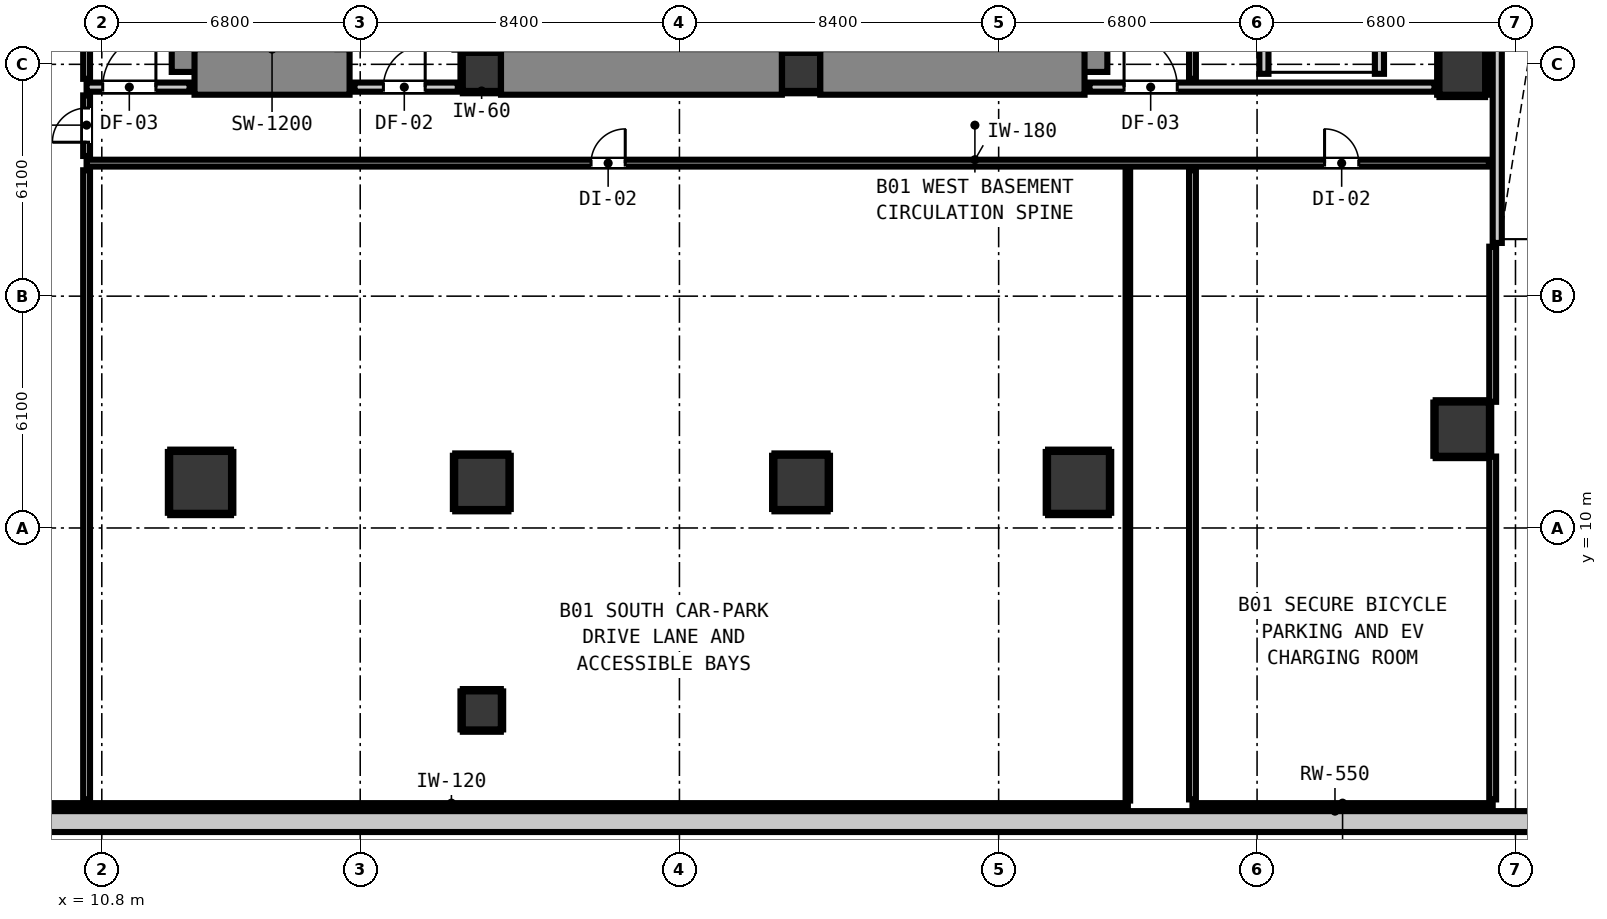
"""IFC4 building model, lengths in metres.
Left out: names, types, materials, properties, quantities, classifications, styles, units other than length and angle.
Written with IfcOpenShell. Run it as: python <this file> out.ifc"""

import sys

from ifc_helpers import new_model, si_unit, direction, frame, frame_2d, origin, origin_2d, place, context, subcontext, project, spatial, rectangle, circle, extrude, element, fill, save


model = new_model("IFC4")
c1 = context("Model", 3, precision=1e-05, world=origin(), true_north=direction((0.0, 1.0)))
c2 = subcontext(c1, "Body", "Model", "MODEL_VIEW")
j1 = project(units=[si_unit("LENGTHUNIT", "METRE"), si_unit("PLANEANGLEUNIT", "RADIAN")], contexts=[c1])
p1 = place(None, origin())
s1 = spatial("IfcSite", under=j1, at=p1, CompositionType="ELEMENT")
p2 = place(p1, origin())
s2 = spatial("IfcBuilding", under=s1, at=p2, CompositionType="ELEMENT")
p3 = place(p2, frame((0.0, 0.0, -4.4)))
s3 = spatial("IfcBuildingStorey", under=s2, at=p3, CompositionType="ELEMENT", Elevation=-4.4)
p4 = place(p3, frame((1.5, 2.275, 0.0), z_axis=(0.0, 0.0, 1.0), x_axis=(1.0, 0.0, 0.0)))
e1 = element("IfcWall", 1, at=p4, inside=s3, PredefinedType="SOLIDWALL", context=c2, shape_type="SweptSolid", body=[
    extrude(rectangle(XDim=83.5, YDim=0.55, at=frame_2d((41.75, 0.0))), origin(), (0.0, 0.0, 1.0), 4.4),
])
for number, where, z_axis, x_axis in (
    (2, (20.8, 22.0, 0.0), (0.0, 0.0, 1.0), (1.0, 0.0, 0.0)),
    (3, (29.2, 22.0, 0.0), (0.0, 0.0, 1.0), (1.0, 0.0, 0.0)),
):
    element("IfcColumn", number, at=place(p3, frame(where, z_axis=z_axis, x_axis=x_axis)), inside=s3, PredefinedType="COLUMN", context=c2, shape_type="SweptSolid", body=[
        extrude(rectangle(XDim=1.0, YDim=1.0, at=origin_2d()), origin(), (0.0, 0.0, 1.0), 4.4),
    ])
p5 = place(p3, frame((13.24, 22.0, 0.0), z_axis=(0.0, 0.0, 1.0), x_axis=(0.0, 1.0, 0.0)))
e4 = element("IfcWall", 4, at=p5, inside=s3, PredefinedType="SHEAR", context=c2, shape_type="SweptSolid", body=[
    extrude(rectangle(XDim=8.195, YDim=1.2, at=frame_2d((4.098, 0.0))), origin(), (0.0, 0.0, 1.0), 4.4),
])
p6 = place(p3, frame((13.24, 22.0, 0.0), z_axis=(0.0, 0.0, 1.0), x_axis=(1.0, 0.0, 0.0)))
e5 = element("IfcWall", 5, at=p6, inside=s3, PredefinedType="SHEAR", context=c2, shape_type="SweptSolid", body=[
    extrude(rectangle(XDim=4.08, YDim=1.2, at=frame_2d((2.04, 0.0))), origin(), (0.0, 0.0, 1.0), 4.4),
])
p7 = place(p3, frame((36.66, 22.0, 0.0), z_axis=(0.0, 0.0, 1.0), x_axis=(0.0, 1.0, 0.0)))
e6 = element("IfcWall", 6, at=p7, inside=s3, PredefinedType="SHEAR", context=c2, shape_type="SweptSolid", body=[
    extrude(rectangle(XDim=8.195, YDim=1.2, at=frame_2d((4.098, 0.0))), origin(), (0.0, 0.0, 1.0), 4.4),
])
p8 = place(p3, frame((29.705, 22.0, 0.0), z_axis=(0.0, 0.0, 1.0), x_axis=(1.0, 0.0, 0.0)))
e7 = element("IfcWall", 7, at=p8, inside=s3, PredefinedType="SHEAR", context=c2, shape_type="SweptSolid", body=[
    extrude(rectangle(XDim=6.955, YDim=1.2, at=frame_2d((3.478, 0.0))), origin(), (0.0, 0.0, 1.0), 4.4),
])
p9 = place(p3, frame((21.305, 22.0, 0.0), z_axis=(0.0, 0.0, 1.0), x_axis=(1.0, 0.0, 0.0)))
e8 = element("IfcWall", 8, at=p9, inside=s3, PredefinedType="SHEAR", context=c2, shape_type="SweptSolid", body=[
    extrude(rectangle(XDim=7.39, YDim=1.2, at=frame_2d((3.695, 0.0))), origin(), (0.0, 0.0, 1.0), 4.4),
])
for number, where, z_axis, x_axis in (
    (9, (13.4, 11.2, 0.0), (0.0, 0.0, 1.0), (1.0, 0.0, 0.0)),
    (10, (36.5, 11.2, 0.0), (0.0, 0.0, 1.0), (1.0, 0.0, 0.0)),
):
    element("IfcColumn", number, at=place(p3, frame(where, z_axis=z_axis, x_axis=x_axis)), inside=s3, PredefinedType="COLUMN", context=c2, shape_type="SweptSolid", body=[
        extrude(rectangle(XDim=1.6, YDim=1.6, at=origin_2d()), origin(), (0.0, 0.0, 1.0), 4.4),
    ])
p10 = place(p3, frame((46.6, 22.0, 0.0), z_axis=(0.0, 0.0, 1.0), x_axis=(1.0, 0.0, 0.0)))
e11 = element("IfcColumn", 11, at=p10, inside=s3, PredefinedType="COLUMN", context=c2, shape_type="SweptSolid", body=[
    extrude(circle(Radius=0.6, at=origin_2d()), origin(), (0.0, 0.0, 1.0), 4.4),
])
for number, where, z_axis, x_axis in (
    (12, (46.6, 12.6, 0.0), (0.0, 0.0, 1.0), (1.0, 0.0, 0.0)),
    (13, (20.8, 11.2, 0.0), (0.0, 0.0, 1.0), (1.0, 0.0, 0.0)),
    (14, (29.2, 11.2, 0.0), (0.0, 0.0, 1.0), (1.0, 0.0, 0.0)),
):
    element("IfcColumn", number, at=place(p3, frame(where, z_axis=z_axis, x_axis=x_axis)), inside=s3, PredefinedType="COLUMN", context=c2, shape_type="SweptSolid", body=[
        extrude(rectangle(XDim=1.4, YDim=1.4, at=origin_2d()), origin(), (0.0, 0.0, 1.0), 4.4),
    ])
p11 = place(p3, frame((20.8, 5.2, 0.0), z_axis=(0.0, 0.0, 1.0), x_axis=(1.0, 0.0, 0.0)))
e15 = element("IfcColumn", 15, at=p11, inside=s3, PredefinedType="COLUMN", context=c2, shape_type="SweptSolid", body=[
    extrude(rectangle(XDim=1.0, YDim=1.0, at=origin_2d()), origin(), (0.0, 0.0, 1.0), 4.16),
])
p12 = place(p3, frame((47.52, 17.5, 0.0), z_axis=(0.0, 0.0, 1.0), x_axis=(0.0, 1.0, 0.0)))
e16 = element("IfcWall", 16, at=p12, inside=s3, PredefinedType="PARAPET", context=c2, shape_type="SweptSolid", body=[
    extrude(rectangle(XDim=19.2, YDim=0.24, at=frame_2d((9.6, 0.0))), origin(), (0.0, 0.0, 1.0), 1.2),
])
for number, where, z_axis, x_axis in (
    (17, (41.38, 21.95, 0.0), (0.0, 0.0, 1.0), (0.0, 1.0, 0.0)),
    (18, (44.42, 21.95, 0.0), (0.0, 0.0, 1.0), (0.0, 1.0, 0.0)),
):
    element("IfcWall", number, at=place(p3, frame(where, z_axis=z_axis, x_axis=x_axis)), inside=s3, PredefinedType="PARAPET", context=c2, shape_type="SweptSolid", body=[
        extrude(rectangle(XDim=28.85, YDim=0.24, at=frame_2d((14.425, 0.0))), origin(), (0.0, 0.0, 1.0), 3.96),
    ])
p13 = place(p3, frame((10.4, 21.6, 0.0), z_axis=(0.0, 0.0, 1.0), x_axis=(1.0, 0.0, 0.0)))
e19 = element("IfcWall", 19, at=p13, inside=s3, PredefinedType="PARTITIONING", context=c2, shape_type="SweptSolid", body=[
    extrude(rectangle(XDim=2.71, YDim=0.24, at=frame_2d((1.355, 0.0))), origin(), (0.0, 0.0, 1.0), 3.215),
])
p14 = place(p13, frame((0.424, 0.0, 0.0)))
e20 = element("IfcOpeningElement", 20, at=p14, cuts=e19, PredefinedType="OPENING", context=c2, shape_type="SweptSolid", body=[
    extrude(rectangle(XDim=1.4, YDim=2.15, at=frame_2d((0.7, 1.075))), frame((0.0, 0.13, 0.0), z_axis=(0.0, -1.0, 0.0), x_axis=(1.0, 0.0, 0.0)), (0.0, 0.0, 1.0), 0.26),
])
p15 = place(p3, frame((17.45, 21.6, 0.0), z_axis=(0.0, 0.0, 1.0), x_axis=(1.0, 0.0, 0.0)))
e21 = element("IfcWall", 21, at=p15, inside=s3, PredefinedType="PARTITIONING", context=c2, shape_type="SweptSolid", body=[
    extrude(rectangle(XDim=2.718, YDim=0.24, at=frame_2d((1.359, 0.0))), origin(), (0.0, 0.0, 1.0), 3.215),
])
p16 = place(p15, frame((0.76, 0.0, 0.0)))
e22 = element("IfcOpeningElement", 22, at=p16, cuts=e21, PredefinedType="OPENING", context=c2, shape_type="SweptSolid", body=[
    extrude(rectangle(XDim=1.1, YDim=2.15, at=frame_2d((0.55, 1.075))), frame((0.0, 0.13, 0.0), z_axis=(0.0, -1.0, 0.0), x_axis=(1.0, 0.0, 0.0)), (0.0, 0.0, 1.0), 0.26),
])
p17 = place(p3, frame((36.79, 21.6, 0.0), z_axis=(0.0, 0.0, 1.0), x_axis=(1.0, 0.0, 0.0)))
e23 = element("IfcWall", 23, at=p17, inside=s3, PredefinedType="PARTITIONING", context=c2, shape_type="SweptSolid", body=[
    extrude(rectangle(XDim=9.078, YDim=0.24, at=frame_2d((4.539, 0.0))), origin(), (0.0, 0.0, 1.0), 3.215),
])
p18 = place(p17, frame((0.91, 0.0, 0.0)))
e24 = element("IfcOpeningElement", 24, at=p18, cuts=e23, PredefinedType="OPENING", context=c2, shape_type="SweptSolid", body=[
    extrude(rectangle(XDim=1.4, YDim=2.15, at=frame_2d((0.7, 1.075))), frame((0.0, 0.13, 0.0), z_axis=(0.0, -1.0, 0.0), x_axis=(1.0, 0.0, 0.0)), (0.0, 0.0, 1.0), 0.26),
])
p19 = place(p3, frame((10.4, 19.6, 0.0), z_axis=(0.0, 0.0, 1.0), x_axis=(1.0, 0.0, 0.0)))
e25 = element("IfcWall", 25, at=p19, inside=s3, PredefinedType="PARTITIONING", context=c2, shape_type="SweptSolid", body=[
    extrude(rectangle(XDim=36.902, YDim=0.18, at=frame_2d((18.451, 0.0))), origin(), (0.0, 0.0, 1.0), 3.98),
])
p20 = place(p19, frame((13.274, 0.0, 0.0)))
e26 = element("IfcOpeningElement", 26, at=p20, cuts=e25, PredefinedType="OPENING", context=c2, shape_type="SweptSolid", body=[
    extrude(rectangle(XDim=0.9, YDim=2.1, at=frame_2d((0.45, 1.05))), frame((0.0, 0.1, 0.0), z_axis=(0.0, -1.0, 0.0), x_axis=(1.0, 0.0, 0.0)), (0.0, 0.0, 1.0), 0.2),
])
p21 = place(p19, frame((32.576, 0.0, 0.0)))
e27 = element("IfcOpeningElement", 27, at=p21, cuts=e25, PredefinedType="OPENING", context=c2, shape_type="SweptSolid", body=[
    extrude(rectangle(XDim=0.9, YDim=2.1, at=frame_2d((0.45, 1.05))), frame((0.0, 0.1, 0.0), z_axis=(0.0, -1.0, 0.0), x_axis=(1.0, 0.0, 0.0)), (0.0, 0.0, 1.0), 0.2),
])
p22 = place(p3, frame((2.2, 2.7, 0.0), z_axis=(0.0, 0.0, 1.0), x_axis=(1.0, 0.0, 0.0)))
e28 = element("IfcWall", 28, at=p22, inside=s3, PredefinedType="PARTITIONING", context=c2, shape_type="SweptSolid", body=[
    extrude(rectangle(XDim=35.6, YDim=0.12, at=frame_2d((17.8, 0.0))), origin(), (0.0, 0.0, 1.0), 3.98),
])
p23 = place(p3, frame((39.5, 2.7, 0.0), z_axis=(0.0, 0.0, 1.0), x_axis=(1.0, 0.0, 0.0)))
e29 = element("IfcWall", 29, at=p23, inside=s3, PredefinedType="PARTITIONING", context=c2, shape_type="SweptSolid", body=[
    extrude(rectangle(XDim=7.9, YDim=0.12, at=frame_2d((3.95, 0.0))), origin(), (0.0, 0.0, 1.0), 3.98),
])
p24 = place(p3, frame((10.4, 2.858, 0.0), z_axis=(0.0, 0.0, 1.0), x_axis=(0.0, 1.0, 0.0)))
e30 = element("IfcWall", 30, at=p24, inside=s3, PredefinedType="PARTITIONING", context=c2, shape_type="SweptSolid", body=[
    extrude(rectangle(XDim=16.554, YDim=0.18, at=frame_2d((8.277, 0.0))), origin(), (0.0, 0.0, 1.0), 3.98),
])
p25 = place(p3, frame((10.4, 19.788, 0.0), z_axis=(0.0, 0.0, 1.0), x_axis=(0.0, 1.0, 0.0)))
e31 = element("IfcWall", 31, at=p25, inside=s3, PredefinedType="PARTITIONING", context=c2, shape_type="SweptSolid", body=[
    extrude(rectangle(XDim=1.594, YDim=0.18, at=frame_2d((0.797, 0.0))), origin(), (0.0, 0.0, 1.0), 3.98),
])
p26 = place(p25, frame((0.362, 0.0, 0.0)))
e32 = element("IfcOpeningElement", 32, at=p26, cuts=e31, PredefinedType="OPENING", context=c2, shape_type="SweptSolid", body=[
    extrude(rectangle(XDim=0.9, YDim=2.1, at=frame_2d((0.45, 1.05))), frame((0.0, 0.1, 0.0), z_axis=(0.0, -1.0, 0.0), x_axis=(1.0, 0.0, 0.0)), (0.0, 0.0, 1.0), 0.2),
])
p27 = place(p3, frame((10.4, 21.818, 0.0), z_axis=(0.0, 0.0, 1.0), x_axis=(0.0, 1.0, 0.0)))
e33 = element("IfcWall", 33, at=p27, inside=s3, PredefinedType="PARTITIONING", context=c2, shape_type="SweptSolid", body=[
    extrude(rectangle(XDim=17.794, YDim=0.18, at=frame_2d((8.897, 0.0))), origin(), (0.0, 0.0, 1.0), 3.98),
])
p28 = place(p3, frame((39.5, 2.858, 0.0), z_axis=(0.0, 0.0, 1.0), x_axis=(0.0, 1.0, 0.0)))
e34 = element("IfcWall", 34, at=p28, inside=s3, PredefinedType="PARTITIONING", context=c2, shape_type="SweptSolid", body=[
    extrude(rectangle(XDim=16.554, YDim=0.18, at=frame_2d((8.277, 0.0))), origin(), (0.0, 0.0, 1.0), 3.98),
])
p29 = place(p3, frame((39.5, 21.818, 0.0), z_axis=(0.0, 0.0, 1.0), x_axis=(0.0, 1.0, 0.0)))
e35 = element("IfcWall", 35, at=p29, inside=s3, PredefinedType="PARTITIONING", context=c2, shape_type="SweptSolid", body=[
    extrude(rectangle(XDim=17.794, YDim=0.18, at=frame_2d((8.897, 0.0))), origin(), (0.0, 0.0, 1.0), 3.98),
])
p30 = place(p3, frame((47.4, 2.858, 0.0), z_axis=(0.0, 0.0, 1.0), x_axis=(0.0, 1.0, 0.0)))
e36 = element("IfcWall", 36, at=p30, inside=s3, PredefinedType="PARTITIONING", context=c2, shape_type="SweptSolid", body=[
    extrude(rectangle(XDim=9.022, YDim=0.18, at=frame_2d((4.511, 0.0))), origin(), (0.0, 0.0, 1.0), 3.98),
])
p31 = place(p3, frame((47.4, 13.32, 0.0), z_axis=(0.0, 0.0, 1.0), x_axis=(0.0, 1.0, 0.0)))
e37 = element("IfcWall", 37, at=p31, inside=s3, PredefinedType="PARTITIONING", context=c2, shape_type="SweptSolid", body=[
    extrude(rectangle(XDim=4.082, YDim=0.18, at=frame_2d((2.041, 0.0))), origin(), (0.0, 0.0, 1.0), 3.98),
])
p32 = place(p3, frame((37.8, 2.828, 0.0), z_axis=(0.0, 0.0, 1.0), x_axis=(0.0, 1.0, 0.0)))
e38 = element("IfcWall", 38, at=p32, inside=s3, PredefinedType="PARTITIONING", context=c2, shape_type="SweptSolid", body=[
    extrude(rectangle(XDim=16.614, YDim=0.12, at=frame_2d((8.307, 0.0))), origin(), (0.0, 0.0, 1.0), 3.98),
])
for number, where, z_axis, x_axis in (
    (39, (20.3, 21.468, 0.0), (0.0, 0.0, 1.0), (1.0, 0.0, 0.0)),
    (40, (20.3, 22.532, 0.0), (0.0, 0.0, 1.0), (1.0, 0.0, 0.0)),
):
    element("IfcWall", number, at=place(p3, frame(where, z_axis=z_axis, x_axis=x_axis)), inside=s3, PredefinedType="PARTITIONING", context=c2, shape_type="SweptSolid", body=[
        extrude(rectangle(XDim=0.99, YDim=0.06, at=frame_2d((0.495, 0.0))), origin(), (0.0, 0.0, 1.0), 1.45),
    ])
p33 = place(p3, frame((20.268, 21.5, 0.0), z_axis=(0.0, 0.0, 1.0), x_axis=(0.0, 1.0, 0.0)))
e41 = element("IfcWall", 41, at=p33, inside=s3, PredefinedType="PARTITIONING", context=c2, shape_type="SweptSolid", body=[
    extrude(rectangle(XDim=1.0, YDim=0.06, at=frame_2d((0.5, 0.0))), origin(), (0.0, 0.0, 1.0), 1.45),
])
for number, where, z_axis, x_axis in (
    (42, (28.71, 21.468, 0.0), (0.0, 0.0, 1.0), (1.0, 0.0, 0.0)),
    (43, (28.71, 22.532, 0.0), (0.0, 0.0, 1.0), (1.0, 0.0, 0.0)),
):
    element("IfcWall", number, at=place(p3, frame(where, z_axis=z_axis, x_axis=x_axis)), inside=s3, PredefinedType="PARTITIONING", context=c2, shape_type="SweptSolid", body=[
        extrude(rectangle(XDim=0.98, YDim=0.06, at=frame_2d((0.49, 0.0))), origin(), (0.0, 0.0, 1.0), 1.45),
    ])
for number, where, z_axis, x_axis in (
    (44, (12.6, 10.368, 0.0), (0.0, 0.0, 1.0), (1.0, 0.0, 0.0)),
    (45, (12.6, 12.032, 0.0), (0.0, 0.0, 1.0), (1.0, 0.0, 0.0)),
):
    element("IfcWall", number, at=place(p3, frame(where, z_axis=z_axis, x_axis=x_axis)), inside=s3, PredefinedType="PARTITIONING", context=c2, shape_type="SweptSolid", body=[
        extrude(rectangle(XDim=1.6, YDim=0.06, at=frame_2d((0.8, 0.0))), origin(), (0.0, 0.0, 1.0), 1.45),
    ])
for number, where, z_axis, x_axis in (
    (46, (12.568, 10.4, 0.0), (0.0, 0.0, 1.0), (0.0, 1.0, 0.0)),
    (47, (14.232, 10.4, 0.0), (0.0, 0.0, 1.0), (0.0, 1.0, 0.0)),
    (48, (35.7, 10.368, 0.0), (0.0, 0.0, 1.0), (1.0, 0.0, 0.0)),
    (49, (35.7, 12.032, 0.0), (0.0, 0.0, 1.0), (1.0, 0.0, 0.0)),
    (50, (35.668, 10.4, 0.0), (0.0, 0.0, 1.0), (0.0, 1.0, 0.0)),
    (51, (37.332, 10.4, 0.0), (0.0, 0.0, 1.0), (0.0, 1.0, 0.0)),
):
    element("IfcWall", number, at=place(p3, frame(where, z_axis=z_axis, x_axis=x_axis)), inside=s3, PredefinedType="PARTITIONING", context=c2, shape_type="SweptSolid", body=[
        extrude(rectangle(XDim=1.6, YDim=0.06, at=frame_2d((0.8, 0.0))), origin(), (0.0, 0.0, 1.0), 1.45),
    ])
p34 = place(p3, frame((46.0, 21.368, 0.0), z_axis=(0.0, 0.0, 1.0), x_axis=(1.0, 0.0, 0.0)))
e52 = element("IfcWall", 52, at=p34, inside=s3, PredefinedType="PARTITIONING", context=c2, shape_type="SweptSolid", body=[
    extrude(rectangle(XDim=1.2, YDim=0.06, at=frame_2d((0.6, 0.0))), origin(), (0.0, 0.0, 1.0), 1.45),
])
for number, where, z_axis, x_axis in (
    (53, (45.968, 21.4, 0.0), (0.0, 0.0, 1.0), (0.0, 1.0, 0.0)),
    (54, (47.232, 21.4, 0.0), (0.0, 0.0, 1.0), (0.0, 1.0, 0.0)),
):
    element("IfcWall", number, at=place(p3, frame(where, z_axis=z_axis, x_axis=x_axis)), inside=s3, PredefinedType="PARTITIONING", context=c2, shape_type="SweptSolid", body=[
        extrude(rectangle(XDim=1.2, YDim=0.06, at=frame_2d((0.6, 0.0))), origin(), (0.0, 0.0, 1.0), 1.45),
    ])
for number, where, z_axis, x_axis in (
    (55, (45.9, 11.868, 0.0), (0.0, 0.0, 1.0), (1.0, 0.0, 0.0)),
    (56, (45.9, 13.332, 0.0), (0.0, 0.0, 1.0), (1.0, 0.0, 0.0)),
    (57, (45.868, 11.9, 0.0), (0.0, 0.0, 1.0), (0.0, 1.0, 0.0)),
    (58, (47.332, 11.9, 0.0), (0.0, 0.0, 1.0), (0.0, 1.0, 0.0)),
):
    element("IfcWall", number, at=place(p3, frame(where, z_axis=z_axis, x_axis=x_axis)), inside=s3, PredefinedType="PARTITIONING", context=c2, shape_type="SweptSolid", body=[
        extrude(rectangle(XDim=1.4, YDim=0.06, at=frame_2d((0.7, 0.0))), origin(), (0.0, 0.0, 1.0), 1.45),
    ])
for number, where, z_axis, x_axis in (
    (59, (20.1, 10.468, 0.0), (0.0, 0.0, 1.0), (1.0, 0.0, 0.0)),
    (60, (20.1, 11.932, 0.0), (0.0, 0.0, 1.0), (1.0, 0.0, 0.0)),
    (61, (20.068, 10.5, 0.0), (0.0, 0.0, 1.0), (0.0, 1.0, 0.0)),
    (62, (21.532, 10.5, 0.0), (0.0, 0.0, 1.0), (0.0, 1.0, 0.0)),
    (63, (28.5, 10.468, 0.0), (0.0, 0.0, 1.0), (1.0, 0.0, 0.0)),
    (64, (28.5, 11.932, 0.0), (0.0, 0.0, 1.0), (1.0, 0.0, 0.0)),
    (65, (28.468, 10.5, 0.0), (0.0, 0.0, 1.0), (0.0, 1.0, 0.0)),
    (66, (29.932, 10.5, 0.0), (0.0, 0.0, 1.0), (0.0, 1.0, 0.0)),
):
    element("IfcWall", number, at=place(p3, frame(where, z_axis=z_axis, x_axis=x_axis)), inside=s3, PredefinedType="PARTITIONING", context=c2, shape_type="SweptSolid", body=[
        extrude(rectangle(XDim=1.4, YDim=0.06, at=frame_2d((0.7, 0.0))), origin(), (0.0, 0.0, 1.0), 1.45),
    ])
for number, where, z_axis, x_axis in (
    (67, (20.3, 4.668, 0.0), (0.0, 0.0, 1.0), (1.0, 0.0, 0.0)),
    (68, (20.3, 5.732, 0.0), (0.0, 0.0, 1.0), (1.0, 0.0, 0.0)),
    (69, (20.268, 4.7, 0.0), (0.0, 0.0, 1.0), (0.0, 1.0, 0.0)),
    (70, (21.332, 4.7, 0.0), (0.0, 0.0, 1.0), (0.0, 1.0, 0.0)),
):
    element("IfcWall", number, at=place(p3, frame(where, z_axis=z_axis, x_axis=x_axis)), inside=s3, PredefinedType="PARTITIONING", context=c2, shape_type="SweptSolid", body=[
        extrude(rectangle(XDim=1.0, YDim=0.06, at=frame_2d((0.5, 0.0))), origin(), (0.0, 0.0, 1.0), 1.45),
    ])
p35 = place(p16, origin())
e71 = element("IfcDoor", 71, at=p35, inside=s3, OperationType="SINGLE_SWING_RIGHT", PredefinedType="DOOR", context=c2, shape_type="SweptSolid", body=[
    extrude(rectangle(XDim=1.1, YDim=2.15, at=frame_2d((0.55, 1.075))), frame((0.0, 0.025, 0.0), z_axis=(0.0, -1.0, 0.0), x_axis=(1.0, 0.0, 0.0)), (0.0, 0.0, 1.0), 0.05),
])
fill(e22, e71)
p36 = place(p14, origin())
e72 = element("IfcDoor", 72, at=p36, inside=s3, OperationType="SINGLE_SWING_RIGHT", PredefinedType="DOOR", context=c2, shape_type="SweptSolid", body=[
    extrude(rectangle(XDim=1.4, YDim=2.15, at=frame_2d((0.7, 1.075))), frame((0.0, 0.025, 0.0), z_axis=(0.0, -1.0, 0.0), x_axis=(1.0, 0.0, 0.0)), (0.0, 0.0, 1.0), 0.05),
])
fill(e20, e72)
p37 = place(p18, origin())
e73 = element("IfcDoor", 73, at=p37, inside=s3, OperationType="SINGLE_SWING_LEFT", PredefinedType="DOOR", context=c2, shape_type="SweptSolid", body=[
    extrude(rectangle(XDim=1.4, YDim=2.15, at=frame_2d((0.7, 1.075))), frame((0.0, 0.025, 0.0), z_axis=(0.0, -1.0, 0.0), x_axis=(1.0, 0.0, 0.0)), (0.0, 0.0, 1.0), 0.05),
])
fill(e24, e73)
p38 = place(p26, origin())
e74 = element("IfcDoor", 74, at=p38, inside=s3, OperationType="SINGLE_SWING_LEFT", PredefinedType="DOOR", context=c2, shape_type="SweptSolid", body=[
    extrude(rectangle(XDim=0.9, YDim=2.1, at=frame_2d((0.45, 1.05))), frame((0.0, 0.025, 0.0), z_axis=(0.0, -1.0, 0.0), x_axis=(1.0, 0.0, 0.0)), (0.0, 0.0, 1.0), 0.05),
])
fill(e32, e74)
p39 = place(p20, origin())
e75 = element("IfcDoor", 75, at=p39, inside=s3, OperationType="SINGLE_SWING_RIGHT", PredefinedType="DOOR", context=c2, shape_type="SweptSolid", body=[
    extrude(rectangle(XDim=0.9, YDim=2.1, at=frame_2d((0.45, 1.05))), frame((0.0, 0.025, 0.0), z_axis=(0.0, -1.0, 0.0), x_axis=(1.0, 0.0, 0.0)), (0.0, 0.0, 1.0), 0.05),
])
fill(e26, e75)
p40 = place(p21, origin())
e76 = element("IfcDoor", 76, at=p40, inside=s3, OperationType="SINGLE_SWING_LEFT", PredefinedType="DOOR", context=c2, shape_type="SweptSolid", body=[
    extrude(rectangle(XDim=0.9, YDim=2.1, at=frame_2d((0.45, 1.05))), frame((0.0, 0.025, 0.0), z_axis=(0.0, -1.0, 0.0), x_axis=(1.0, 0.0, 0.0)), (0.0, 0.0, 1.0), 0.05),
])
fill(e27, e76)
save(model, sys.argv[1])
